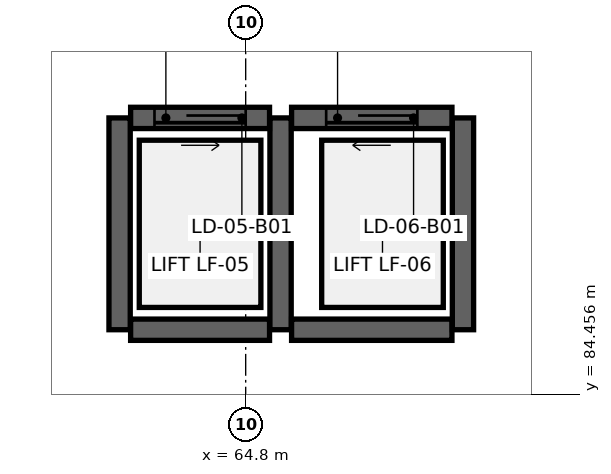
"""IFC4 building model, lengths in metres.
Left out: names, types, materials, properties, quantities, classifications, styles, units other than length and angle.
Written with IfcOpenShell. Run it as: python <this file> out.ifc"""

import sys

from ifc_helpers import new_model, si_unit, direction, frame, frame_2d, origin, place, context, subcontext, project, spatial, rectangle, extrude, element, fill, save


model = new_model("IFC4")
c1 = context("Model", 3, precision=1e-05, world=origin(), true_north=direction((0.0, 1.0)))
c2 = subcontext(c1, "Body", "Model", "MODEL_VIEW")
j1 = project(units=[si_unit("LENGTHUNIT", "METRE"), si_unit("PLANEANGLEUNIT", "RADIAN")], contexts=[c1])
p1 = place(None, origin())
s1 = spatial("IfcSite", under=j1, at=p1, CompositionType="ELEMENT")
p2 = place(p1, origin())
s2 = spatial("IfcBuilding", under=s1, at=p2, CompositionType="ELEMENT")
p3 = place(p2, frame((0.0, 0.0, -4.2)))
s3 = spatial("IfcBuildingStorey", under=s2, at=p3, CompositionType="ELEMENT", Elevation=-4.2)
p4 = place(p3, frame((63.286, 85.307, 0.0), z_axis=(0.0, 0.0, 1.0), x_axis=(1.0, 0.0, 0.0)))
e1 = element("IfcWall", 1, at=p4, inside=s3, PredefinedType="SHEAR", context=c2, shape_type="SweptSolid", body=[
    extrude(rectangle(XDim=1.828, YDim=0.28, at=frame_2d((0.914, 0.0))), origin(), (0.0, 0.0, 1.0), 3.78),
])
p5 = place(p3, frame((65.259, 85.307, 0.0), z_axis=(0.0, 0.0, 1.0), x_axis=(0.0, 1.0, 0.0)))
e2 = element("IfcWall", 2, at=p5, inside=s3, PredefinedType="SHEAR", context=c2, shape_type="SweptSolid", body=[
    extrude(rectangle(XDim=2.787, YDim=0.28, at=frame_2d((1.393, 0.0))), origin(), (0.0, 0.0, 1.0), 3.78),
])
p6 = place(p3, frame((65.114, 88.093, 0.0), z_axis=(0.0, 0.0, 1.0), x_axis=(-1.0, 0.0, 0.0)))
e3 = element("IfcWall", 3, at=p6, inside=s3, PredefinedType="SHEAR", context=c2, shape_type="SweptSolid", body=[
    extrude(rectangle(XDim=1.828, YDim=0.28, at=frame_2d((0.914, 0.0))), origin(), (0.0, 0.0, 1.0), 3.78),
])
p7 = place(p6, frame((0.314, 0.0, 0.0)))
e4 = element("IfcOpeningElement", 4, at=p7, cuts=e3, PredefinedType="OPENING", context=c2, shape_type="SweptSolid", body=[
    extrude(rectangle(XDim=1.2, YDim=2.15, at=frame_2d((0.6, 1.075))), frame((0.0, 0.152, 0.0), z_axis=(0.0, -1.0, 0.0), x_axis=(1.0, 0.0, 0.0)), (0.0, 0.0, 1.0), 0.304),
])
p8 = place(p3, frame((63.141, 88.093, 0.0), z_axis=(0.0, 0.0, 1.0), x_axis=(0.0, -1.0, 0.0)))
e5 = element("IfcWall", 5, at=p8, inside=s3, PredefinedType="SHEAR", context=c2, shape_type="SweptSolid", body=[
    extrude(rectangle(XDim=2.787, YDim=0.28, at=frame_2d((1.393, 0.0))), origin(), (0.0, 0.0, 1.0), 3.78),
])
p9 = place(p3, frame((65.404, 85.307, 0.0), z_axis=(0.0, 0.0, 1.0), x_axis=(1.0, 0.0, 0.0)))
e6 = element("IfcWall", 6, at=p9, inside=s3, PredefinedType="SHEAR", context=c2, shape_type="SweptSolid", body=[
    extrude(rectangle(XDim=2.11, YDim=0.28, at=frame_2d((1.055, 0.0))), origin(), (0.0, 0.0, 1.0), 3.78),
])
p10 = place(p3, frame((67.659, 85.307, 0.0), z_axis=(0.0, 0.0, 1.0), x_axis=(0.0, 1.0, 0.0)))
e7 = element("IfcWall", 7, at=p10, inside=s3, PredefinedType="SHEAR", context=c2, shape_type="SweptSolid", body=[
    extrude(rectangle(XDim=2.787, YDim=0.28, at=frame_2d((1.393, 0.0))), origin(), (0.0, 0.0, 1.0), 3.78),
])
p11 = place(p3, frame((67.514, 88.093, 0.0), z_axis=(0.0, 0.0, 1.0), x_axis=(-1.0, 0.0, 0.0)))
e8 = element("IfcWall", 8, at=p11, inside=s3, PredefinedType="SHEAR", context=c2, shape_type="SweptSolid", body=[
    extrude(rectangle(XDim=2.11, YDim=0.28, at=frame_2d((1.055, 0.0))), origin(), (0.0, 0.0, 1.0), 3.78),
])
p12 = place(p11, frame((0.455, 0.0, 0.0)))
e9 = element("IfcOpeningElement", 9, at=p12, cuts=e8, PredefinedType="OPENING", context=c2, shape_type="SweptSolid", body=[
    extrude(rectangle(XDim=1.2, YDim=2.15, at=frame_2d((0.6, 1.075))), frame((0.0, 0.152, 0.0), z_axis=(0.0, -1.0, 0.0), x_axis=(1.0, 0.0, 0.0)), (0.0, 0.0, 1.0), 0.304),
])
p13 = place(p7, origin())
e10 = element("IfcDoor", 10, at=p13, inside=s3, OperationType="SLIDING_TO_LEFT", PredefinedType="DOOR", context=c2, shape_type="SweptSolid", body=[
    extrude(rectangle(XDim=1.2, YDim=2.15, at=frame_2d((0.6, 1.075))), frame((0.0, 0.025, 0.0), z_axis=(0.0, -1.0, 0.0), x_axis=(1.0, 0.0, 0.0)), (0.0, 0.0, 1.0), 0.05),
])
fill(e4, e10)
p14 = place(p12, origin())
e11 = element("IfcDoor", 11, at=p14, inside=s3, OperationType="SLIDING_TO_RIGHT", PredefinedType="DOOR", context=c2, shape_type="SweptSolid", body=[
    extrude(rectangle(XDim=1.2, YDim=2.15, at=frame_2d((0.6, 1.075))), frame((0.0, 0.025, 0.0), z_axis=(0.0, -1.0, 0.0), x_axis=(1.0, 0.0, 0.0)), (0.0, 0.0, 1.0), 0.05),
])
fill(e9, e11)
save(model, sys.argv[1])
